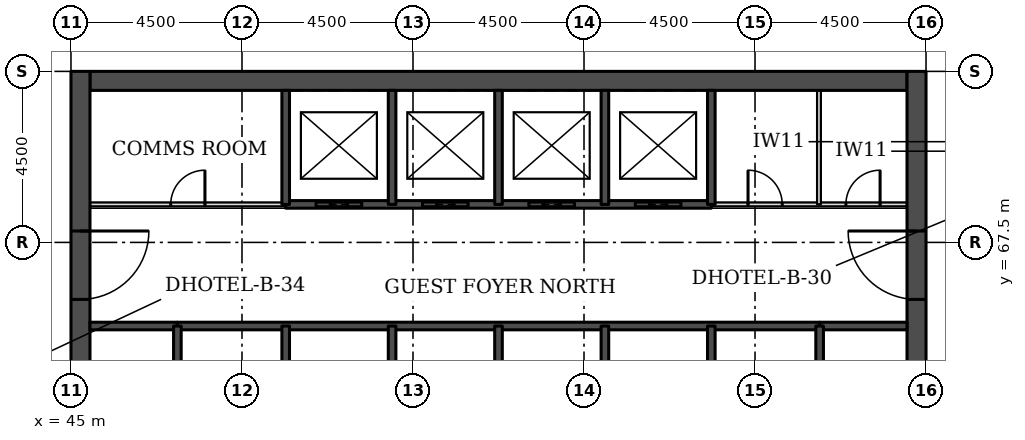
"""IFC4 building model, lengths in metres.
Left out: names, types, materials, properties, quantities, classifications, styles, units other than length and angle.
Written with IfcOpenShell. Run it as: python <this file> out.ifc"""

import sys

from ifc_helpers import new_model, si_unit, direction, frame, frame_2d, origin, place, context, subcontext, project, spatial, rectangle, extrude, element, fill, save


model = new_model("IFC4")
c1 = context("Model", 3, precision=1e-05, world=origin(), true_north=direction((0.0, 1.0)))
c2 = subcontext(c1, "Body", "Model", "MODEL_VIEW")
j1 = project(units=[si_unit("LENGTHUNIT", "METRE"), si_unit("PLANEANGLEUNIT", "RADIAN")], contexts=[c1])
p1 = place(None, origin())
s1 = spatial("IfcSite", under=j1, at=p1, CompositionType="ELEMENT")
p2 = place(p1, origin())
s2 = spatial("IfcBuilding", under=s1, at=p2, CompositionType="ELEMENT")
p3 = place(p2, frame((0.0, 0.0, 29.7)))
s3 = spatial("IfcBuildingStorey", under=s2, at=p3, CompositionType="ELEMENT", Elevation=29.7)
p4 = place(p3, frame((45.5, 71.75, 0.0), z_axis=(0.0, 0.0, 1.0), x_axis=(1.0, 0.0, 0.0)))
e1 = element("IfcWall", 1, at=p4, inside=s3, PredefinedType="SHEAR", context=c2, shape_type="SweptSolid", body=[
    extrude(rectangle(XDim=21.5, YDim=0.5, at=frame_2d((10.75, 0.0))), origin(), (0.0, 0.0, 1.0), 3.3),
])
p5 = place(p3, frame((45.25, 49.5, 0.0), z_axis=(0.0, 0.0, 1.0), x_axis=(0.0, 1.0, 0.0)))
e2 = element("IfcWall", 2, at=p5, inside=s3, PredefinedType="SHEAR", context=c2, shape_type="SweptSolid", body=[
    extrude(rectangle(XDim=22.5, YDim=0.5, at=frame_2d((11.25, 0.0))), origin(), (0.0, 0.0, 1.0), 3.3),
])
p6 = place(p5, frame((4.2, 0.0, 0.0)))
e3 = element("IfcOpeningElement", 3, at=p6, cuts=e2, PredefinedType="OPENING", context=c2, shape_type="SweptSolid", body=[
    extrude(rectangle(XDim=1.8, YDim=2.1, at=frame_2d((0.9, 1.05))), frame((0.0, 0.26, 0.0), z_axis=(0.0, -1.0, 0.0), x_axis=(1.0, 0.0, 0.0)), (0.0, 0.0, 1.0), 0.52),
])
p7 = place(p5, frame((6.9, 0.0, 0.0)))
e4 = element("IfcOpeningElement", 4, at=p7, cuts=e2, PredefinedType="OPENING", context=c2, shape_type="SweptSolid", body=[
    extrude(rectangle(XDim=1.1, YDim=2.1, at=frame_2d((0.55, 1.05))), frame((0.0, 0.26, 0.0), z_axis=(0.0, -1.0, 0.0), x_axis=(1.0, 0.0, 0.0)), (0.0, 0.0, 1.0), 0.52),
])
p8 = place(p5, frame((13.6, 0.0, 0.0)))
e5 = element("IfcOpeningElement", 5, at=p8, cuts=e2, PredefinedType="OPENING", context=c2, shape_type="SweptSolid", body=[
    extrude(rectangle(XDim=1.1, YDim=2.1, at=frame_2d((0.55, 1.05))), frame((0.0, 0.26, 0.0), z_axis=(0.0, -1.0, 0.0), x_axis=(1.0, 0.0, 0.0)), (0.0, 0.0, 1.0), 0.52),
])
p9 = place(p5, frame((16.5, 0.0, 0.0)))
e6 = element("IfcOpeningElement", 6, at=p9, cuts=e2, PredefinedType="OPENING", context=c2, shape_type="SweptSolid", body=[
    extrude(rectangle(XDim=1.8, YDim=2.1, at=frame_2d((0.9, 1.05))), frame((0.0, 0.26, 0.0), z_axis=(0.0, -1.0, 0.0), x_axis=(1.0, 0.0, 0.0)), (0.0, 0.0, 1.0), 0.52),
])
p10 = place(p3, frame((67.25, 49.5, 0.0), z_axis=(0.0, 0.0, 1.0), x_axis=(0.0, 1.0, 0.0)))
e7 = element("IfcWall", 7, at=p10, inside=s3, PredefinedType="SHEAR", context=c2, shape_type="SweptSolid", body=[
    extrude(rectangle(XDim=22.5, YDim=0.5, at=frame_2d((11.25, 0.0))), origin(), (0.0, 0.0, 1.0), 3.3),
])
p11 = place(p10, frame((4.2, 0.0, 0.0)))
e8 = element("IfcOpeningElement", 8, at=p11, cuts=e7, PredefinedType="OPENING", context=c2, shape_type="SweptSolid", body=[
    extrude(rectangle(XDim=1.8, YDim=2.1, at=frame_2d((0.9, 1.05))), frame((0.0, 0.26, 0.0), z_axis=(0.0, -1.0, 0.0), x_axis=(1.0, 0.0, 0.0)), (0.0, 0.0, 1.0), 0.52),
])
p12 = place(p10, frame((6.9, 0.0, 0.0)))
e9 = element("IfcOpeningElement", 9, at=p12, cuts=e7, PredefinedType="OPENING", context=c2, shape_type="SweptSolid", body=[
    extrude(rectangle(XDim=1.1, YDim=2.1, at=frame_2d((0.55, 1.05))), frame((0.0, 0.26, 0.0), z_axis=(0.0, -1.0, 0.0), x_axis=(1.0, 0.0, 0.0)), (0.0, 0.0, 1.0), 0.52),
])
p13 = place(p10, frame((13.6, 0.0, 0.0)))
e10 = element("IfcOpeningElement", 10, at=p13, cuts=e7, PredefinedType="OPENING", context=c2, shape_type="SweptSolid", body=[
    extrude(rectangle(XDim=1.1, YDim=2.1, at=frame_2d((0.55, 1.05))), frame((0.0, 0.26, 0.0), z_axis=(0.0, -1.0, 0.0), x_axis=(1.0, 0.0, 0.0)), (0.0, 0.0, 1.0), 0.52),
])
p14 = place(p10, frame((16.5, 0.0, 0.0)))
e11 = element("IfcOpeningElement", 11, at=p14, cuts=e7, PredefinedType="OPENING", context=c2, shape_type="SweptSolid", body=[
    extrude(rectangle(XDim=1.8, YDim=2.1, at=frame_2d((0.9, 1.05))), frame((0.0, 0.26, 0.0), z_axis=(0.0, -1.0, 0.0), x_axis=(1.0, 0.0, 0.0)), (0.0, 0.0, 1.0), 0.52),
])
for number, where, z_axis, x_axis in (
    (12, (45.5, 65.3, 0.0), (0.0, 0.0, 1.0), (1.0, 0.0, 0.0)),
    (13, (64.7, 65.3, 0.0), (0.0, 0.0, 1.0), (1.0, 0.0, 0.0)),
):
    element("IfcWall", number, at=place(p3, frame(where, z_axis=z_axis, x_axis=x_axis)), inside=s3, PredefinedType="SOLIDWALL", context=c2, shape_type="SweptSolid", body=[
        extrude(rectangle(XDim=2.3, YDim=0.2, at=frame_2d((1.15, 0.0))), origin(), (0.0, 0.0, 1.0), 3.08),
    ])
p15 = place(p3, frame((47.8, 65.3, 0.0), z_axis=(0.0, 0.0, 1.0), x_axis=(1.0, 0.0, 0.0)))
e14 = element("IfcWall", 14, at=p15, inside=s3, PredefinedType="SOLIDWALL", context=c2, shape_type="SweptSolid", body=[
    extrude(rectangle(XDim=16.9, YDim=0.2, at=frame_2d((8.45, 0.0))), origin(), (0.0, 0.0, 1.0), 3.08),
])
p16 = place(p3, frame((45.5, 68.5, 0.0), z_axis=(0.0, 0.0, 1.0), x_axis=(1.0, 0.0, 0.0)))
e15 = element("IfcWall", 15, at=p16, inside=s3, PredefinedType="PARTITIONING", context=c2, shape_type="SweptSolid", body=[
    extrude(rectangle(XDim=5.15, YDim=0.1, at=frame_2d((2.575, 0.0))), origin(), (0.0, 0.0, 1.0), 3.08),
])
p17 = place(p16, frame((2.125, 0.0, 0.0)))
e16 = element("IfcOpeningElement", 16, at=p17, cuts=e15, PredefinedType="OPENING", context=c2, shape_type="SweptSolid", body=[
    extrude(rectangle(XDim=0.9, YDim=2.1, at=frame_2d((0.45, 1.05))), frame((0.0, 0.06, 0.0), z_axis=(0.0, -1.0, 0.0), x_axis=(1.0, 0.0, 0.0)), (0.0, 0.0, 1.0), 0.12),
])
p18 = place(p3, frame((61.85, 68.5, 0.0), z_axis=(0.0, 0.0, 1.0), x_axis=(1.0, 0.0, 0.0)))
e17 = element("IfcWall", 17, at=p18, inside=s3, PredefinedType="PARTITIONING", context=c2, shape_type="SweptSolid", body=[
    extrude(rectangle(XDim=5.15, YDim=0.1, at=frame_2d((2.575, 0.0))), origin(), (0.0, 0.0, 1.0), 3.08),
])
p19 = place(p18, frame((3.541, 0.0, 0.0)))
e18 = element("IfcOpeningElement", 18, at=p19, cuts=e17, PredefinedType="OPENING", context=c2, shape_type="SweptSolid", body=[
    extrude(rectangle(XDim=0.9, YDim=2.1, at=frame_2d((0.45, 1.05))), frame((0.0, 0.06, 0.0), z_axis=(0.0, -1.0, 0.0), x_axis=(1.0, 0.0, 0.0)), (0.0, 0.0, 1.0), 0.12),
])
p20 = place(p18, frame((0.966, 0.0, 0.0)))
e19 = element("IfcOpeningElement", 19, at=p20, cuts=e17, PredefinedType="OPENING", context=c2, shape_type="SweptSolid", body=[
    extrude(rectangle(XDim=0.9, YDim=2.1, at=frame_2d((0.45, 1.05))), frame((0.0, 0.06, 0.0), z_axis=(0.0, -1.0, 0.0), x_axis=(1.0, 0.0, 0.0)), (0.0, 0.0, 1.0), 0.12),
])
p21 = place(p3, frame((50.65, 68.5, 0.0), z_axis=(0.0, 0.0, 1.0), x_axis=(1.0, 0.0, 0.0)))
e20 = element("IfcWall", 20, at=p21, inside=s3, PredefinedType="SOLIDWALL", context=c2, shape_type="SweptSolid", body=[
    extrude(rectangle(XDim=11.2, YDim=0.2, at=frame_2d((5.6, 0.0))), origin(), (0.0, 0.0, 1.0), 3.08),
])
p22 = place(p21, frame((0.8, 0.0, 0.0)))
e21 = element("IfcOpeningElement", 21, at=p22, cuts=e20, PredefinedType="OPENING", context=c2, shape_type="SweptSolid", body=[
    extrude(rectangle(XDim=1.2, YDim=2.1, at=frame_2d((0.6, 1.05))), frame((0.0, 0.11, 0.0), z_axis=(0.0, -1.0, 0.0), x_axis=(1.0, 0.0, 0.0)), (0.0, 0.0, 1.0), 0.22),
])
p23 = place(p21, frame((3.6, 0.0, 0.0)))
e22 = element("IfcOpeningElement", 22, at=p23, cuts=e20, PredefinedType="OPENING", context=c2, shape_type="SweptSolid", body=[
    extrude(rectangle(XDim=1.2, YDim=2.1, at=frame_2d((0.6, 1.05))), frame((0.0, 0.11, 0.0), z_axis=(0.0, -1.0, 0.0), x_axis=(1.0, 0.0, 0.0)), (0.0, 0.0, 1.0), 0.22),
])
p24 = place(p21, frame((6.4, 0.0, 0.0)))
e23 = element("IfcOpeningElement", 23, at=p24, cuts=e20, PredefinedType="OPENING", context=c2, shape_type="SweptSolid", body=[
    extrude(rectangle(XDim=1.2, YDim=2.1, at=frame_2d((0.6, 1.05))), frame((0.0, 0.11, 0.0), z_axis=(0.0, -1.0, 0.0), x_axis=(1.0, 0.0, 0.0)), (0.0, 0.0, 1.0), 0.22),
])
p25 = place(p21, frame((9.2, 0.0, 0.0)))
e24 = element("IfcOpeningElement", 24, at=p25, cuts=e20, PredefinedType="OPENING", context=c2, shape_type="SweptSolid", body=[
    extrude(rectangle(XDim=1.2, YDim=2.1, at=frame_2d((0.6, 1.05))), frame((0.0, 0.11, 0.0), z_axis=(0.0, -1.0, 0.0), x_axis=(1.0, 0.0, 0.0)), (0.0, 0.0, 1.0), 0.22),
])
p26 = place(p3, frame((47.8, 62.0, 0.0), z_axis=(0.0, 0.0, 1.0), x_axis=(0.0, 1.0, 0.0)))
e25 = element("IfcWall", 25, at=p26, inside=s3, PredefinedType="SOLIDWALL", context=c2, shape_type="SweptSolid", body=[
    extrude(rectangle(XDim=3.3, YDim=0.2, at=frame_2d((1.65, 0.0))), origin(), (0.0, 0.0, 1.0), 3.08),
])
p27 = place(p26, frame((1.1, 0.0, 0.0)))
e26 = element("IfcOpeningElement", 26, at=p27, cuts=e25, PredefinedType="OPENING", context=c2, shape_type="SweptSolid", body=[
    extrude(rectangle(XDim=1.1, YDim=2.1, at=frame_2d((0.55, 1.05))), frame((0.0, 0.11, 0.0), z_axis=(0.0, -1.0, 0.0), x_axis=(1.0, 0.0, 0.0)), (0.0, 0.0, 1.0), 0.22),
])
p28 = place(p3, frame((50.65, 62.0, 0.0), z_axis=(0.0, 0.0, 1.0), x_axis=(0.0, 1.0, 0.0)))
e27 = element("IfcWall", 27, at=p28, inside=s3, PredefinedType="SOLIDWALL", context=c2, shape_type="SweptSolid", body=[
    extrude(rectangle(XDim=3.3, YDim=0.2, at=frame_2d((1.65, 0.0))), origin(), (0.0, 0.0, 1.0), 3.08),
])
p29 = place(p3, frame((50.65, 68.5, 0.0), z_axis=(0.0, 0.0, 1.0), x_axis=(0.0, 1.0, 0.0)))
e28 = element("IfcWall", 28, at=p29, inside=s3, PredefinedType="SOLIDWALL", context=c2, shape_type="SweptSolid", body=[
    extrude(rectangle(XDim=3.0, YDim=0.2, at=frame_2d((1.5, 0.0))), origin(), (0.0, 0.0, 1.0), 3.08),
])
p30 = place(p3, frame((53.45, 62.5, 0.0), z_axis=(0.0, 0.0, 1.0), x_axis=(0.0, 1.0, 0.0)))
e29 = element("IfcWall", 29, at=p30, inside=s3, PredefinedType="SOLIDWALL", context=c2, shape_type="SweptSolid", body=[
    extrude(rectangle(XDim=2.8, YDim=0.2, at=frame_2d((1.4, 0.0))), origin(), (0.0, 0.0, 1.0), 3.08),
])
p31 = place(p3, frame((53.45, 68.5, 0.0), z_axis=(0.0, 0.0, 1.0), x_axis=(0.0, 1.0, 0.0)))
e30 = element("IfcWall", 30, at=p31, inside=s3, PredefinedType="SOLIDWALL", context=c2, shape_type="SweptSolid", body=[
    extrude(rectangle(XDim=3.0, YDim=0.2, at=frame_2d((1.5, 0.0))), origin(), (0.0, 0.0, 1.0), 3.08),
])
p32 = place(p3, frame((56.25, 62.5, 0.0), z_axis=(0.0, 0.0, 1.0), x_axis=(0.0, 1.0, 0.0)))
e31 = element("IfcWall", 31, at=p32, inside=s3, PredefinedType="SOLIDWALL", context=c2, shape_type="SweptSolid", body=[
    extrude(rectangle(XDim=2.8, YDim=0.2, at=frame_2d((1.4, 0.0))), origin(), (0.0, 0.0, 1.0), 3.08),
])
p33 = place(p3, frame((56.25, 68.5, 0.0), z_axis=(0.0, 0.0, 1.0), x_axis=(0.0, 1.0, 0.0)))
e32 = element("IfcWall", 32, at=p33, inside=s3, PredefinedType="SOLIDWALL", context=c2, shape_type="SweptSolid", body=[
    extrude(rectangle(XDim=3.0, YDim=0.2, at=frame_2d((1.5, 0.0))), origin(), (0.0, 0.0, 1.0), 3.08),
])
p34 = place(p3, frame((59.05, 62.5, 0.0), z_axis=(0.0, 0.0, 1.0), x_axis=(0.0, 1.0, 0.0)))
e33 = element("IfcWall", 33, at=p34, inside=s3, PredefinedType="SOLIDWALL", context=c2, shape_type="SweptSolid", body=[
    extrude(rectangle(XDim=2.8, YDim=0.2, at=frame_2d((1.4, 0.0))), origin(), (0.0, 0.0, 1.0), 3.08),
])
p35 = place(p3, frame((59.05, 68.5, 0.0), z_axis=(0.0, 0.0, 1.0), x_axis=(0.0, 1.0, 0.0)))
e34 = element("IfcWall", 34, at=p35, inside=s3, PredefinedType="SOLIDWALL", context=c2, shape_type="SweptSolid", body=[
    extrude(rectangle(XDim=3.0, YDim=0.2, at=frame_2d((1.5, 0.0))), origin(), (0.0, 0.0, 1.0), 3.08),
])
p36 = place(p3, frame((61.85, 62.0, 0.0), z_axis=(0.0, 0.0, 1.0), x_axis=(0.0, 1.0, 0.0)))
e35 = element("IfcWall", 35, at=p36, inside=s3, PredefinedType="SOLIDWALL", context=c2, shape_type="SweptSolid", body=[
    extrude(rectangle(XDim=3.3, YDim=0.2, at=frame_2d((1.65, 0.0))), origin(), (0.0, 0.0, 1.0), 3.08),
])
p37 = place(p3, frame((61.85, 68.5, 0.0), z_axis=(0.0, 0.0, 1.0), x_axis=(0.0, 1.0, 0.0)))
e36 = element("IfcWall", 36, at=p37, inside=s3, PredefinedType="SOLIDWALL", context=c2, shape_type="SweptSolid", body=[
    extrude(rectangle(XDim=3.0, YDim=0.2, at=frame_2d((1.5, 0.0))), origin(), (0.0, 0.0, 1.0), 3.08),
])
p38 = place(p3, frame((64.683, 68.5, 0.0), z_axis=(0.0, 0.0, 1.0), x_axis=(0.0, 1.0, 0.0)))
e37 = element("IfcWall", 37, at=p38, inside=s3, PredefinedType="PARTITIONING", context=c2, shape_type="SweptSolid", body=[
    extrude(rectangle(XDim=3.0, YDim=0.1, at=frame_2d((1.5, 0.0))), origin(), (0.0, 0.0, 1.0), 3.08),
])
p39 = place(p3, frame((64.7, 62.0, 0.0), z_axis=(0.0, 0.0, 1.0), x_axis=(0.0, 1.0, 0.0)))
e38 = element("IfcWall", 38, at=p39, inside=s3, PredefinedType="SOLIDWALL", context=c2, shape_type="SweptSolid", body=[
    extrude(rectangle(XDim=3.3, YDim=0.2, at=frame_2d((1.65, 0.0))), origin(), (0.0, 0.0, 1.0), 3.08),
])
p40 = place(p39, frame((1.1, 0.0, 0.0)))
e39 = element("IfcOpeningElement", 39, at=p40, cuts=e38, PredefinedType="OPENING", context=c2, shape_type="SweptSolid", body=[
    extrude(rectangle(XDim=1.1, YDim=2.1, at=frame_2d((0.55, 1.05))), frame((0.0, 0.11, 0.0), z_axis=(0.0, -1.0, 0.0), x_axis=(1.0, 0.0, 0.0)), (0.0, 0.0, 1.0), 0.22),
])
p41 = place(p22, origin())
e40 = element("IfcDoor", 40, at=p41, inside=s3, OperationType="DOUBLE_DOOR_SLIDING", PredefinedType="DOOR", context=c2, shape_type="SweptSolid", body=[
    extrude(rectangle(XDim=1.2, YDim=2.1, at=frame_2d((0.6, 1.05))), frame((0.0, 0.025, 0.0), z_axis=(0.0, -1.0, 0.0), x_axis=(1.0, 0.0, 0.0)), (0.0, 0.0, 1.0), 0.05),
])
fill(e21, e40)
p42 = place(p23, origin())
e41 = element("IfcDoor", 41, at=p42, inside=s3, OperationType="DOUBLE_DOOR_SLIDING", PredefinedType="DOOR", context=c2, shape_type="SweptSolid", body=[
    extrude(rectangle(XDim=1.2, YDim=2.1, at=frame_2d((0.6, 1.05))), frame((0.0, 0.025, 0.0), z_axis=(0.0, -1.0, 0.0), x_axis=(1.0, 0.0, 0.0)), (0.0, 0.0, 1.0), 0.05),
])
fill(e22, e41)
p43 = place(p24, origin())
e42 = element("IfcDoor", 42, at=p43, inside=s3, OperationType="DOUBLE_DOOR_SLIDING", PredefinedType="DOOR", context=c2, shape_type="SweptSolid", body=[
    extrude(rectangle(XDim=1.2, YDim=2.1, at=frame_2d((0.6, 1.05))), frame((0.0, 0.025, 0.0), z_axis=(0.0, -1.0, 0.0), x_axis=(1.0, 0.0, 0.0)), (0.0, 0.0, 1.0), 0.05),
])
fill(e23, e42)
p44 = place(p25, origin())
e43 = element("IfcDoor", 43, at=p44, inside=s3, OperationType="DOUBLE_DOOR_SLIDING", PredefinedType="DOOR", context=c2, shape_type="SweptSolid", body=[
    extrude(rectangle(XDim=1.2, YDim=2.1, at=frame_2d((0.6, 1.05))), frame((0.0, 0.025, 0.0), z_axis=(0.0, -1.0, 0.0), x_axis=(1.0, 0.0, 0.0)), (0.0, 0.0, 1.0), 0.05),
])
fill(e24, e43)
p45 = place(p9, frame((1.8, 0.0, 0.0), z_axis=(0.0, 0.0, 1.0), x_axis=(-1.0, 0.0, 0.0)))
e44 = element("IfcDoor", 44, at=p45, inside=s3, OperationType="SINGLE_SWING_LEFT", PredefinedType="DOOR", context=c2, shape_type="SweptSolid", body=[
    extrude(rectangle(XDim=1.8, YDim=2.1, at=frame_2d((0.9, 1.05))), frame((0.0, 0.025, 0.0), z_axis=(0.0, -1.0, 0.0), x_axis=(1.0, 0.0, 0.0)), (0.0, 0.0, 1.0), 0.05),
])
fill(e6, e44)
p46 = place(p14, origin())
e45 = element("IfcDoor", 45, at=p46, inside=s3, OperationType="SINGLE_SWING_RIGHT", PredefinedType="DOOR", context=c2, shape_type="SweptSolid", body=[
    extrude(rectangle(XDim=1.8, YDim=2.1, at=frame_2d((0.9, 1.05))), frame((0.0, 0.025, 0.0), z_axis=(0.0, -1.0, 0.0), x_axis=(1.0, 0.0, 0.0)), (0.0, 0.0, 1.0), 0.05),
])
fill(e11, e45)
p47 = place(p19, origin())
e46 = element("IfcDoor", 46, at=p47, inside=s3, OperationType="SINGLE_SWING_RIGHT", PredefinedType="DOOR", context=c2, shape_type="SweptSolid", body=[
    extrude(rectangle(XDim=0.9, YDim=2.1, at=frame_2d((0.45, 1.05))), frame((0.0, 0.025, 0.0), z_axis=(0.0, -1.0, 0.0), x_axis=(1.0, 0.0, 0.0)), (0.0, 0.0, 1.0), 0.05),
])
fill(e18, e46)
p48 = place(p20, origin())
e47 = element("IfcDoor", 47, at=p48, inside=s3, OperationType="SINGLE_SWING_LEFT", PredefinedType="DOOR", context=c2, shape_type="SweptSolid", body=[
    extrude(rectangle(XDim=0.9, YDim=2.1, at=frame_2d((0.45, 1.05))), frame((0.0, 0.025, 0.0), z_axis=(0.0, -1.0, 0.0), x_axis=(1.0, 0.0, 0.0)), (0.0, 0.0, 1.0), 0.05),
])
fill(e19, e47)
p49 = place(p17, origin())
e48 = element("IfcDoor", 48, at=p49, inside=s3, OperationType="SINGLE_SWING_RIGHT", PredefinedType="DOOR", context=c2, shape_type="SweptSolid", body=[
    extrude(rectangle(XDim=0.9, YDim=2.1, at=frame_2d((0.45, 1.05))), frame((0.0, 0.025, 0.0), z_axis=(0.0, -1.0, 0.0), x_axis=(1.0, 0.0, 0.0)), (0.0, 0.0, 1.0), 0.05),
])
fill(e16, e48)
save(model, sys.argv[1])
